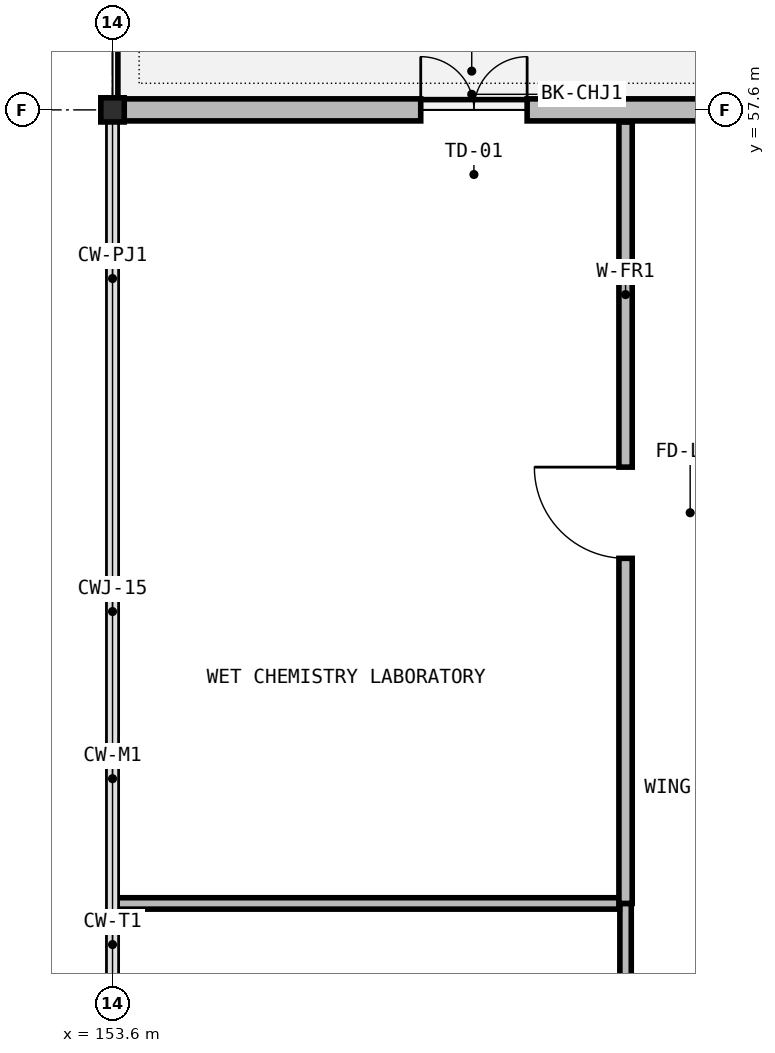
"""IFC4 building model, lengths in metres.
Left out: names, types, materials, properties, quantities, classifications, styles, units other than length and angle.
Written with IfcOpenShell. Run it as: python <this file> out.ifc"""

import sys

from ifc_helpers import new_model, si_unit, direction, frame, frame_2d, origin, origin_2d, place, context, subcontext, project, spatial, rectangle, i_section, extrude, element, fill, save


model = new_model("IFC4")
c1 = context("Model", 3, precision=1e-05, world=origin(), true_north=direction((0.0, 1.0)))
c2 = subcontext(c1, "Body", "Model", "MODEL_VIEW")
j1 = project(units=[si_unit("LENGTHUNIT", "METRE"), si_unit("PLANEANGLEUNIT", "RADIAN")], contexts=[c1])
p1 = place(None, origin())
s1 = spatial("IfcSite", under=j1, at=p1, CompositionType="ELEMENT")
p2 = place(p1, origin())
s2 = spatial("IfcBuilding", under=s1, at=p2, CompositionType="ELEMENT")
p3 = place(p2, frame((0.0, 0.0, 37.1)))
s3 = spatial("IfcBuildingStorey", under=s2, at=p3, CompositionType="ELEMENT", Elevation=37.1)
p4 = place(p3, frame((153.6, 57.6, 0.0), z_axis=(0.0, 0.0, 1.0), x_axis=(1.0, 0.0, 0.0)))
e1 = element("IfcColumn", 1, at=p4, inside=s3, PredefinedType="COLUMN", context=c2, shape_type="SweptSolid", body=[
    extrude(i_section(OverallWidth=0.308, OverallDepth=0.318, WebThickness=0.013, FlangeThickness=0.021, at=origin_2d()), origin(), (0.0, 0.0, 1.0), 4.55),
])
p5 = place(p3, frame((153.455, 57.6, 0.0), z_axis=(0.0, 0.0, 1.0), x_axis=(1.0, 0.0, 0.0)))
e2 = element("IfcWall", 2, at=p5, inside=s3, PredefinedType="SOLIDWALL", context=c2, shape_type="SweptSolid", body=[
    extrude(rectangle(XDim=9.741, YDim=0.29, at=frame_2d((4.871, 0.0))), origin(), (0.0, 0.0, 1.0), 3.825),
])
p6 = place(p5, frame((4.2, 0.0, 0.0)))
e3 = element("IfcOpeningElement", 3, at=p6, cuts=e2, PredefinedType="OPENING", context=c2, shape_type="SweptSolid", body=[
    extrude(rectangle(XDim=1.4, YDim=2.2, at=frame_2d((0.7, 1.1))), frame((0.0, 0.155, 0.0), z_axis=(0.0, -1.0, 0.0), x_axis=(1.0, 0.0, 0.0)), (0.0, 0.0, 1.0), 0.31),
])
p7 = place(p3, frame((160.35, 37.96, 0.0), z_axis=(0.0, 0.0, 1.0), x_axis=(0.0, 1.0, 0.0)))
e4 = element("IfcWall", 4, at=p7, inside=s3, PredefinedType="PARTITIONING", context=c2, shape_type="SweptSolid", body=[
    extrude(rectangle(XDim=9.2, YDim=0.15, at=frame_2d((4.6, 0.0))), origin(), (0.0, 0.0, 1.0), 4.3),
])
p8 = place(p7, frame((4.1, 0.0, 0.0)))
e5 = element("IfcOpeningElement", 5, at=p8, cuts=e4, PredefinedType="OPENING", context=c2, shape_type="SweptSolid", body=[
    extrude(rectangle(XDim=1.0, YDim=2.2, at=frame_2d((0.5, 1.1))), frame((0.0, 0.085, 0.0), z_axis=(0.0, -1.0, 0.0), x_axis=(1.0, 0.0, 0.0)), (0.0, 0.0, 1.0), 0.17),
])
p9 = place(p3, frame((153.66, 47.16, 0.0), z_axis=(0.0, 0.0, 1.0), x_axis=(1.0, 0.0, 0.0)))
e6 = element("IfcWall", 6, at=p9, inside=s3, PredefinedType="PARTITIONING", context=c2, shape_type="SweptSolid", body=[
    extrude(rectangle(XDim=6.61, YDim=0.15, at=frame_2d((3.305, 0.0))), origin(), (0.0, 0.0, 1.0), 4.3),
])
p10 = place(p3, frame((160.35, 47.16, 0.0), z_axis=(0.0, 0.0, 1.0), x_axis=(0.0, 1.0, 0.0)))
e7 = element("IfcWall", 7, at=p10, inside=s3, PredefinedType="PARTITIONING", context=c2, shape_type="SweptSolid", body=[
    extrude(rectangle(XDim=10.28, YDim=0.175, at=frame_2d((5.14, 0.0))), origin(), (0.0, 0.0, 1.0), 4.3),
])
p11 = place(p10, frame((4.54, 0.0, 0.0)))
e8 = element("IfcOpeningElement", 8, at=p11, cuts=e7, PredefinedType="OPENING", context=c2, shape_type="SweptSolid", body=[
    extrude(rectangle(XDim=1.2, YDim=2.2, at=frame_2d((0.6, 1.1))), frame((0.0, 0.097, 0.0), z_axis=(0.0, -1.0, 0.0), x_axis=(1.0, 0.0, 0.0)), (0.0, 0.0, 1.0), 0.195),
])
p12 = place(p6, origin())
e9 = element("IfcDoor", 9, at=p12, inside=s3, OperationType="DOUBLE_DOOR_SINGLE_SWING", PredefinedType="DOOR", context=c2, shape_type="SweptSolid", body=[
    extrude(rectangle(XDim=1.4, YDim=2.2, at=frame_2d((0.7, 1.1))), frame((0.0, 0.025, 0.0), z_axis=(0.0, -1.0, 0.0), x_axis=(1.0, 0.0, 0.0)), (0.0, 0.0, 1.0), 0.05),
])
fill(e3, e9)
p13 = place(p11, origin())
e10 = element("IfcDoor", 10, at=p13, inside=s3, OperationType="SINGLE_SWING_RIGHT", PredefinedType="DOOR", context=c2, shape_type="SweptSolid", body=[
    extrude(rectangle(XDim=1.2, YDim=2.2, at=frame_2d((0.6, 1.1))), frame((0.0, 0.025, 0.0), z_axis=(0.0, -1.0, 0.0), x_axis=(1.0, 0.0, 0.0)), (0.0, 0.0, 1.0), 0.05),
])
fill(e8, e10)
save(model, sys.argv[1])
